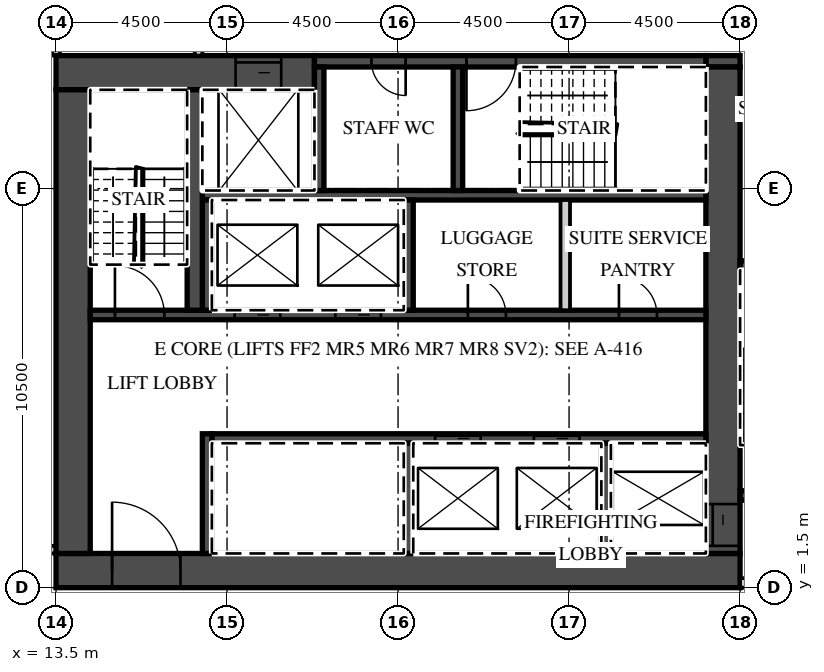
"""IFC4 building model, lengths in metres.
Left out: names, types, materials, properties, quantities, classifications, styles, units other than length and angle.
Written with IfcOpenShell. Run it as: python <this file> out.ifc"""

import sys

from ifc_helpers import new_model, si_unit, direction, frame, frame_2d, origin, place, context, subcontext, project, spatial, rectangle, extrude, element, fill, save


model = new_model("IFC4")
c1 = context("Model", 3, precision=1e-05, world=origin(), true_north=direction((0.0, 1.0)))
c2 = subcontext(c1, "Body", "Model", "MODEL_VIEW")
j1 = project(units=[si_unit("LENGTHUNIT", "METRE"), si_unit("PLANEANGLEUNIT", "RADIAN")], contexts=[c1])
p1 = place(None, origin())
s1 = spatial("IfcSite", under=j1, at=p1, CompositionType="ELEMENT")
p2 = place(p1, origin())
s2 = spatial("IfcBuilding", under=s1, at=p2, CompositionType="ELEMENT")
p3 = place(p2, frame((0.0, 0.0, 190.0)))
s3 = spatial("IfcBuildingStorey", under=s2, at=p3, CompositionType="ELEMENT", Elevation=190.0)
p4 = place(p3, frame((13.5, 15.5, 0.0), z_axis=(0.0, 0.0, 1.0), x_axis=(0.0, 1.0, 0.0)))
e1 = element("IfcWall", 1, at=p4, inside=s3, PredefinedType="PARTITIONING", context=c2, shape_type="SweptSolid", body=[
    extrude(rectangle(XDim=6.089, YDim=0.2, at=frame_2d((3.044, 0.0))), origin(), (0.0, 0.0, 1.0), 3.02),
])
p5 = place(p3, frame((-13.5, 2.5, 0.0), z_axis=(0.0, 0.0, 1.0), x_axis=(1.0, 0.0, 0.0)))
e2 = element("IfcWall", 2, at=p5, inside=s3, PredefinedType="PARTITIONING", context=c2, shape_type="SweptSolid", body=[
    extrude(rectangle(XDim=27.0, YDim=0.2, at=frame_2d((13.5, 0.0))), origin(), (0.0, 0.0, 1.0), 3.02),
])
p6 = place(p5, frame((0.575, 0.0, 0.0)))
e3 = element("IfcOpeningElement", 3, at=p6, cuts=e2, PredefinedType="OPENING", context=c2, shape_type="SweptSolid", body=[
    extrude(rectangle(XDim=1.0, YDim=2.1, at=frame_2d((0.5, 1.05))), frame((0.0, 0.11, 0.0), z_axis=(0.0, -1.0, 0.0), x_axis=(1.0, 0.0, 0.0)), (0.0, 0.0, 1.0), 0.22),
])
p7 = place(p5, frame((9.863, 0.0, 0.0)))
e4 = element("IfcOpeningElement", 4, at=p7, cuts=e2, PredefinedType="OPENING", context=c2, shape_type="SweptSolid", body=[
    extrude(rectangle(XDim=1.2, YDim=2.1, at=frame_2d((0.6, 1.05))), frame((0.0, 0.11, 0.0), z_axis=(0.0, -1.0, 0.0), x_axis=(1.0, 0.0, 0.0)), (0.0, 0.0, 1.0), 0.22),
])
p8 = place(p5, frame((18.862, 0.0, 0.0)))
e5 = element("IfcOpeningElement", 5, at=p8, cuts=e2, PredefinedType="OPENING", context=c2, shape_type="SweptSolid", body=[
    extrude(rectangle(XDim=1.2, YDim=2.1, at=frame_2d((0.6, 1.05))), frame((0.0, 0.11, 0.0), z_axis=(0.0, -1.0, 0.0), x_axis=(1.0, 0.0, 0.0)), (0.0, 0.0, 1.0), 0.22),
])
p9 = place(p5, frame((25.425, 0.0, 0.0)))
e6 = element("IfcOpeningElement", 6, at=p9, cuts=e2, PredefinedType="OPENING", context=c2, shape_type="SweptSolid", body=[
    extrude(rectangle(XDim=1.0, YDim=2.1, at=frame_2d((0.5, 1.05))), frame((0.0, 0.11, 0.0), z_axis=(0.0, -1.0, 0.0), x_axis=(1.0, 0.0, 0.0)), (0.0, 0.0, 1.0), 0.22),
])
p10 = place(p3, frame((13.5, 1.95, 0.0), z_axis=(0.0, 0.0, 1.0), x_axis=(1.0, 0.0, 0.0)))
e7 = element("IfcWall", 7, at=p10, inside=s3, PredefinedType="SHEAR", context=c2, shape_type="SweptSolid", body=[
    extrude(rectangle(XDim=18.0, YDim=0.9, at=frame_2d((9.0, 0.0))), origin(), (0.0, 0.0, 1.0), 3.02),
])
p11 = place(p10, frame((1.475, 0.0, 0.0)))
e8 = element("IfcOpeningElement", 8, at=p11, cuts=e7, PredefinedType="OPENING", context=c2, shape_type="SweptSolid", body=[
    extrude(rectangle(XDim=1.8, YDim=2.1, at=frame_2d((0.9, 1.05))), frame((0.0, 0.46, 0.0), z_axis=(0.0, -1.0, 0.0), x_axis=(1.0, 0.0, 0.0)), (0.0, 0.0, 1.0), 0.92),
])
p12 = place(p3, frame((13.5, 15.05, 0.0), z_axis=(0.0, 0.0, 1.0), x_axis=(1.0, 0.0, 0.0)))
e9 = element("IfcWall", 9, at=p12, inside=s3, PredefinedType="SHEAR", context=c2, shape_type="SweptSolid", body=[
    extrude(rectangle(XDim=6.8, YDim=0.9, at=frame_2d((3.4, 0.0))), origin(), (0.0, 0.0, 1.0), 3.02),
])
p13 = place(p12, frame((4.725, 0.0, 0.0)))
e10 = element("IfcOpeningElement", 10, at=p13, cuts=e9, PredefinedType="OPENING", context=c2, shape_type="SweptSolid", body=[
    extrude(rectangle(XDim=1.2, YDim=2.1, at=frame_2d((0.6, 1.05))), frame((0.0, 0.46, 0.0), z_axis=(0.0, -1.0, 0.0), x_axis=(1.0, 0.0, 0.0)), (0.0, 0.0, 1.0), 0.92),
])
p14 = place(p3, frame((30.6, 15.35, 0.0), z_axis=(0.0, 0.0, 1.0), x_axis=(1.0, 0.0, 0.0)))
e11 = element("IfcWall", 11, at=p14, inside=s3, PredefinedType="SHEAR", context=c2, shape_type="SweptSolid", body=[
    extrude(rectangle(XDim=0.9, YDim=0.3, at=frame_2d((0.45, 0.0))), origin(), (0.0, 0.0, 1.0), 3.02),
])
p15 = place(p3, frame((20.3, 15.35, 0.0), z_axis=(0.0, 0.0, 1.0), x_axis=(1.0, 0.0, 0.0)))
e12 = element("IfcWall", 12, at=p15, inside=s3, PredefinedType="SHEAR", context=c2, shape_type="SweptSolid", body=[
    extrude(rectangle(XDim=10.3, YDim=0.3, at=frame_2d((5.15, 0.0))), origin(), (0.0, 0.0, 1.0), 3.02),
])
p16 = place(p15, frame((4.0, 0.0, 0.0)))
e13 = element("IfcOpeningElement", 13, at=p16, cuts=e12, PredefinedType="OPENING", context=c2, shape_type="SweptSolid", body=[
    extrude(rectangle(XDim=1.3, YDim=2.1, at=frame_2d((0.65, 1.05))), frame((0.0, 0.16, 0.0), z_axis=(0.0, -1.0, 0.0), x_axis=(1.0, 0.0, 0.0)), (0.0, 0.0, 1.0), 0.32),
])
p17 = place(p15, frame((1.5, 0.0, 0.0)))
e14 = element("IfcOpeningElement", 14, at=p17, cuts=e12, PredefinedType="OPENING", context=c2, shape_type="SweptSolid", body=[
    extrude(rectangle(XDim=0.9, YDim=2.1, at=frame_2d((0.45, 1.05))), frame((0.0, 0.16, 0.0), z_axis=(0.0, -1.0, 0.0), x_axis=(1.0, 0.0, 0.0)), (0.0, 0.0, 1.0), 0.32),
])
p18 = place(p3, frame((31.05, 2.4, 0.0), z_axis=(0.0, 0.0, 1.0), x_axis=(0.0, 1.0, 0.0)))
e15 = element("IfcWall", 15, at=p18, inside=s3, PredefinedType="SHEAR", context=c2, shape_type="SweptSolid", body=[
    extrude(rectangle(XDim=12.8, YDim=0.9, at=frame_2d((6.4, 0.0))), origin(), (0.0, 0.0, 1.0), 3.02),
])
p19 = place(p18, frame((0.2, 0.0, 0.0)))
e16 = element("IfcOpeningElement", 16, at=p19, cuts=e15, PredefinedType="OPENING", context=c2, shape_type="SweptSolid", body=[
    extrude(rectangle(XDim=1.1, YDim=2.1, at=frame_2d((0.55, 1.05))), frame((0.0, 0.46, 0.0), z_axis=(0.0, -1.0, 0.0), x_axis=(1.0, 0.0, 0.0)), (0.0, 0.0, 1.0), 0.92),
])
p20 = place(p3, frame((13.95, 2.4, 0.0), z_axis=(0.0, 0.0, 1.0), x_axis=(0.0, 1.0, 0.0)))
e17 = element("IfcWall", 17, at=p20, inside=s3, PredefinedType="SHEAR", context=c2, shape_type="SweptSolid", body=[
    extrude(rectangle(XDim=12.2, YDim=0.9, at=frame_2d((6.1, 0.0))), origin(), (0.0, 0.0, 1.0), 3.02),
])
p21 = place(p3, frame((17.6, 5.425, 0.0), z_axis=(0.0, 0.0, 1.0), x_axis=(1.0, 0.0, 0.0)))
e18 = element("IfcWall", 18, at=p21, inside=s3, PredefinedType="SHEAR", context=c2, shape_type="SweptSolid", body=[
    extrude(rectangle(XDim=13.0, YDim=0.25, at=frame_2d((6.5, 0.0))), origin(), (0.0, 0.0, 1.0), 3.02),
])
p22 = place(p21, frame((8.475, 0.0, 0.0)))
e19 = element("IfcOpeningElement", 19, at=p22, cuts=e18, PredefinedType="OPENING", context=c2, shape_type="SweptSolid", body=[
    extrude(rectangle(XDim=1.2, YDim=2.1, at=frame_2d((0.6, 1.05))), frame((0.0, 0.135, 0.0), z_axis=(0.0, -1.0, 0.0), x_axis=(1.0, 0.0, 0.0)), (0.0, 0.0, 1.0), 0.27),
])
p23 = place(p21, frame((5.875, 0.0, 0.0)))
e20 = element("IfcOpeningElement", 20, at=p23, cuts=e18, PredefinedType="OPENING", context=c2, shape_type="SweptSolid", body=[
    extrude(rectangle(XDim=1.2, YDim=2.1, at=frame_2d((0.6, 1.05))), frame((0.0, 0.135, 0.0), z_axis=(0.0, -1.0, 0.0), x_axis=(1.0, 0.0, 0.0)), (0.0, 0.0, 1.0), 0.27),
])
p24 = place(p3, frame((17.475, 2.4, 0.0), z_axis=(0.0, 0.0, 1.0), x_axis=(0.0, 1.0, 0.0)))
e21 = element("IfcWall", 21, at=p24, inside=s3, PredefinedType="SHEAR", context=c2, shape_type="SweptSolid", body=[
    extrude(rectangle(XDim=3.15, YDim=0.25, at=frame_2d((1.575, 0.0))), origin(), (0.0, 0.0, 1.0), 3.02),
])
for number, where, z_axis, x_axis in (
    (22, (27.975, 2.4, 0.0), (0.0, 0.0, 1.0), (0.0, 1.0, 0.0)),
    (23, (22.775, 2.4, 0.0), (0.0, 0.0, 1.0), (0.0, 1.0, 0.0)),
):
    element("IfcWall", number, at=place(p3, frame(where, z_axis=z_axis, x_axis=x_axis)), inside=s3, PredefinedType="SHEAR", context=c2, shape_type="SweptSolid", body=[
        extrude(rectangle(XDim=2.9, YDim=0.25, at=frame_2d((1.45, 0.0))), origin(), (0.0, 0.0, 1.0), 3.02),
    ])
p25 = place(p3, frame((14.4, 8.675, 0.0), z_axis=(0.0, 0.0, 1.0), x_axis=(1.0, 0.0, 0.0)))
e24 = element("IfcWall", 24, at=p25, inside=s3, PredefinedType="SHEAR", context=c2, shape_type="SweptSolid", body=[
    extrude(rectangle(XDim=16.2, YDim=0.25, at=frame_2d((8.1, 0.0))), origin(), (0.0, 0.0, 1.0), 3.02),
])
p26 = place(p25, frame((6.45, 0.0, 0.0)))
e25 = element("IfcOpeningElement", 25, at=p26, cuts=e24, PredefinedType="OPENING", context=c2, shape_type="SweptSolid", body=[
    extrude(rectangle(XDim=1.2, YDim=2.1, at=frame_2d((0.6, 1.05))), frame((0.0, 0.135, 0.0), z_axis=(0.0, -1.0, 0.0), x_axis=(1.0, 0.0, 0.0)), (0.0, 0.0, 1.0), 0.27),
])
p27 = place(p25, frame((3.8, 0.0, 0.0)))
e26 = element("IfcOpeningElement", 26, at=p27, cuts=e24, PredefinedType="OPENING", context=c2, shape_type="SweptSolid", body=[
    extrude(rectangle(XDim=1.2, YDim=2.1, at=frame_2d((0.6, 1.05))), frame((0.0, 0.135, 0.0), z_axis=(0.0, -1.0, 0.0), x_axis=(1.0, 0.0, 0.0)), (0.0, 0.0, 1.0), 0.27),
])
p28 = place(p25, frame((0.65, 0.0, 0.0)))
e27 = element("IfcOpeningElement", 27, at=p28, cuts=e24, PredefinedType="OPENING", context=c2, shape_type="SweptSolid", body=[
    extrude(rectangle(XDim=1.3, YDim=2.1, at=frame_2d((0.65, 1.05))), frame((0.0, 0.135, 0.0), z_axis=(0.0, -1.0, 0.0), x_axis=(1.0, 0.0, 0.0)), (0.0, 0.0, 1.0), 0.27),
])
p29 = place(p25, frame((13.913, 0.0, 0.0)))
e28 = element("IfcOpeningElement", 28, at=p29, cuts=e24, PredefinedType="OPENING", context=c2, shape_type="SweptSolid", body=[
    extrude(rectangle(XDim=1.0, YDim=2.1, at=frame_2d((0.5, 1.05))), frame((0.0, 0.135, 0.0), z_axis=(0.0, -1.0, 0.0), x_axis=(1.0, 0.0, 0.0)), (0.0, 0.0, 1.0), 0.27),
])
p30 = place(p25, frame((9.938, 0.0, 0.0)))
e29 = element("IfcOpeningElement", 29, at=p30, cuts=e24, PredefinedType="OPENING", context=c2, shape_type="SweptSolid", body=[
    extrude(rectangle(XDim=1.0, YDim=2.1, at=frame_2d((0.5, 1.05))), frame((0.0, 0.135, 0.0), z_axis=(0.0, -1.0, 0.0), x_axis=(1.0, 0.0, 0.0)), (0.0, 0.0, 1.0), 0.27),
])
p31 = place(p3, frame((17.35, 11.825, 0.0), z_axis=(0.0, 0.0, 1.0), x_axis=(1.0, 0.0, 0.0)))
e30 = element("IfcWall", 30, at=p31, inside=s3, PredefinedType="SHEAR", context=c2, shape_type="SweptSolid", body=[
    extrude(rectangle(XDim=13.25, YDim=0.25, at=frame_2d((6.625, 0.0))), origin(), (0.0, 0.0, 1.0), 3.02),
])
for number, where, z_axis, x_axis in (
    (31, (17.475, 8.8, 0.0), (0.0, 0.0, 1.0), (0.0, 1.0, 0.0)),
    (32, (22.775, 8.8, 0.0), (0.0, 0.0, 1.0), (0.0, 1.0, 0.0)),
):
    element("IfcWall", number, at=place(p3, frame(where, z_axis=z_axis, x_axis=x_axis)), inside=s3, PredefinedType="SHEAR", context=c2, shape_type="SweptSolid", body=[
        extrude(rectangle(XDim=2.9, YDim=0.25, at=frame_2d((1.45, 0.0))), origin(), (0.0, 0.0, 1.0), 3.02),
    ])
p32 = place(p3, frame((26.9, 8.8, 0.0), z_axis=(0.0, 0.0, 1.0), x_axis=(0.0, 1.0, 0.0)))
e33 = element("IfcWall", 33, at=p32, inside=s3, PredefinedType="PARTITIONING", context=c2, shape_type="SweptSolid", body=[
    extrude(rectangle(XDim=2.9, YDim=0.25, at=frame_2d((1.45, 0.0))), origin(), (0.0, 0.0, 1.0), 3.02),
])
p33 = place(p3, frame((17.15, 8.8, 0.0), z_axis=(0.0, 0.0, 1.0), x_axis=(0.0, 1.0, 0.0)))
e34 = element("IfcWall", 34, at=p33, inside=s3, PredefinedType="SHEAR", context=c2, shape_type="SweptSolid", body=[
    extrude(rectangle(XDim=5.8, YDim=0.4, at=frame_2d((2.9, 0.0))), origin(), (0.0, 0.0, 1.0), 3.02),
])
for number, where, z_axis, x_axis in (
    (35, (20.425, 11.95, 0.0), (0.0, 0.0, 1.0), (0.0, 1.0, 0.0)),
    (36, (24.075, 11.95, 0.0), (0.0, 0.0, 1.0), (0.0, 1.0, 0.0)),
):
    element("IfcWall", number, at=place(p3, frame(where, z_axis=z_axis, x_axis=x_axis)), inside=s3, PredefinedType="SHEAR", context=c2, shape_type="SweptSolid", body=[
        extrude(rectangle(XDim=3.25, YDim=0.25, at=frame_2d((1.625, 0.0))), origin(), (0.0, 0.0, 1.0), 3.02),
    ])
p34 = place(p3, frame((31.5, 1.625, 0.0), z_axis=(0.0, 0.0, 1.0), x_axis=(1.0, 0.0, 0.0)))
e37 = element("IfcWall", 37, at=p34, inside=s3, PredefinedType="PARTITIONING", context=c2, shape_type="SweptSolid", body=[
    extrude(rectangle(XDim=8.035, YDim=0.25, at=frame_2d((4.018, 0.0))), origin(), (0.0, 0.0, 1.0), 3.02),
])
p35 = place(p34, frame((0.625, 0.0, 0.0)))
e38 = element("IfcOpeningElement", 38, at=p35, cuts=e37, PredefinedType="OPENING", context=c2, shape_type="SweptSolid", body=[
    extrude(rectangle(XDim=1.3, YDim=2.1, at=frame_2d((0.65, 1.05))), frame((0.0, 0.135, 0.0), z_axis=(0.0, -1.0, 0.0), x_axis=(1.0, 0.0, 0.0)), (0.0, 0.0, 1.0), 0.27),
])
p36 = place(p34, frame((3.25, 0.0, 0.0)))
e39 = element("IfcOpeningElement", 39, at=p36, cuts=e37, PredefinedType="OPENING", context=c2, shape_type="SweptSolid", body=[
    extrude(rectangle(XDim=1.1, YDim=2.1, at=frame_2d((0.55, 1.05))), frame((0.0, 0.135, 0.0), z_axis=(0.0, -1.0, 0.0), x_axis=(1.0, 0.0, 0.0)), (0.0, 0.0, 1.0), 0.27),
])
p37 = place(p3, frame((31.5, 3.925, 0.0), z_axis=(0.0, 0.0, 1.0), x_axis=(1.0, 0.0, 0.0)))
e40 = element("IfcWall", 40, at=p37, inside=s3, PredefinedType="SHEAR", context=c2, shape_type="SweptSolid", body=[
    extrude(rectangle(XDim=2.55, YDim=0.25, at=frame_2d((1.275, 0.0))), origin(), (0.0, 0.0, 1.0), 3.02),
])
p38 = place(p37, frame((0.625, 0.0, 0.0)))
e41 = element("IfcOpeningElement", 41, at=p38, cuts=e40, PredefinedType="OPENING", context=c2, shape_type="SweptSolid", body=[
    extrude(rectangle(XDim=1.3, YDim=2.1, at=frame_2d((0.65, 1.05))), frame((0.0, 0.135, 0.0), z_axis=(0.0, -1.0, 0.0), x_axis=(1.0, 0.0, 0.0)), (0.0, 0.0, 1.0), 0.27),
])
p39 = place(p3, frame((31.5, 9.975, 0.0), z_axis=(0.0, 0.0, 1.0), x_axis=(1.0, 0.0, 0.0)))
e42 = element("IfcWall", 42, at=p39, inside=s3, PredefinedType="SHEAR", context=c2, shape_type="SweptSolid", body=[
    extrude(rectangle(XDim=2.55, YDim=0.25, at=frame_2d((1.275, 0.0))), origin(), (0.0, 0.0, 1.0), 3.02),
])
p40 = place(p3, frame((17.25, 15.5, 0.0), z_axis=(0.0, 0.0, 1.0), x_axis=(0.0, 1.0, 0.0)))
e43 = element("IfcWall", 43, at=p40, inside=s3, PredefinedType="PARTITIONING", context=c2, shape_type="SweptSolid", body=[
    extrude(rectangle(XDim=2.2, YDim=0.2, at=frame_2d((1.1, 0.0))), origin(), (0.0, 0.0, 1.0), 3.02),
])
p41 = place(p26, origin())
e44 = element("IfcDoor", 44, at=p41, inside=s3, OperationType="SLIDING_TO_LEFT", PredefinedType="DOOR", context=c2, shape_type="SweptSolid", body=[
    extrude(rectangle(XDim=1.2, YDim=2.1, at=frame_2d((0.6, 1.05))), frame((0.0, 0.025, 0.0), z_axis=(0.0, -1.0, 0.0), x_axis=(1.0, 0.0, 0.0)), (0.0, 0.0, 1.0), 0.05),
])
fill(e25, e44)
p42 = place(p27, origin())
e45 = element("IfcDoor", 45, at=p42, inside=s3, OperationType="SLIDING_TO_RIGHT", PredefinedType="DOOR", context=c2, shape_type="SweptSolid", body=[
    extrude(rectangle(XDim=1.2, YDim=2.1, at=frame_2d((0.6, 1.05))), frame((0.0, 0.025, 0.0), z_axis=(0.0, -1.0, 0.0), x_axis=(1.0, 0.0, 0.0)), (0.0, 0.0, 1.0), 0.05),
])
fill(e26, e45)
p43 = place(p22, origin())
e46 = element("IfcDoor", 46, at=p43, inside=s3, OperationType="SLIDING_TO_LEFT", PredefinedType="DOOR", context=c2, shape_type="SweptSolid", body=[
    extrude(rectangle(XDim=1.2, YDim=2.1, at=frame_2d((0.6, 1.05))), frame((0.0, 0.025, 0.0), z_axis=(0.0, -1.0, 0.0), x_axis=(1.0, 0.0, 0.0)), (0.0, 0.0, 1.0), 0.05),
])
fill(e19, e46)
p44 = place(p23, origin())
e47 = element("IfcDoor", 47, at=p44, inside=s3, OperationType="SLIDING_TO_RIGHT", PredefinedType="DOOR", context=c2, shape_type="SweptSolid", body=[
    extrude(rectangle(XDim=1.2, YDim=2.1, at=frame_2d((0.6, 1.05))), frame((0.0, 0.025, 0.0), z_axis=(0.0, -1.0, 0.0), x_axis=(1.0, 0.0, 0.0)), (0.0, 0.0, 1.0), 0.05),
])
fill(e20, e47)
p45 = place(p13, origin())
e48 = element("IfcDoor", 48, at=p45, inside=s3, OperationType="SLIDING_TO_LEFT", PredefinedType="DOOR", context=c2, shape_type="SweptSolid", body=[
    extrude(rectangle(XDim=1.2, YDim=2.1, at=frame_2d((0.6, 1.05))), frame((0.0, 0.025, 0.0), z_axis=(0.0, -1.0, 0.0), x_axis=(1.0, 0.0, 0.0)), (0.0, 0.0, 1.0), 0.05),
])
fill(e10, e48)
p46 = place(p19, origin())
e49 = element("IfcDoor", 49, at=p46, inside=s3, OperationType="SLIDING_TO_LEFT", PredefinedType="DOOR", context=c2, shape_type="SweptSolid", body=[
    extrude(rectangle(XDim=1.1, YDim=2.1, at=frame_2d((0.55, 1.05))), frame((0.0, 0.025, 0.0), z_axis=(0.0, -1.0, 0.0), x_axis=(1.0, 0.0, 0.0)), (0.0, 0.0, 1.0), 0.05),
])
fill(e16, e49)
p47 = place(p11, origin())
e50 = element("IfcDoor", 50, at=p47, inside=s3, OperationType="DOUBLE_DOOR_DOUBLE_SWING", PredefinedType="DOOR", context=c2, shape_type="SweptSolid", body=[
    extrude(rectangle(XDim=1.8, YDim=2.1, at=frame_2d((0.9, 1.05))), frame((0.0, 0.025, 0.0), z_axis=(0.0, -1.0, 0.0), x_axis=(1.0, 0.0, 0.0)), (0.0, 0.0, 1.0), 0.05),
])
fill(e8, e50)
p48 = place(p28, origin())
e51 = element("IfcDoor", 51, at=p48, inside=s3, OperationType="SINGLE_SWING_LEFT", PredefinedType="DOOR", context=c2, shape_type="SweptSolid", body=[
    extrude(rectangle(XDim=1.3, YDim=2.1, at=frame_2d((0.65, 1.05))), frame((0.0, 0.025, 0.0), z_axis=(0.0, -1.0, 0.0), x_axis=(1.0, 0.0, 0.0)), (0.0, 0.0, 1.0), 0.05),
])
fill(e27, e51)
p49 = place(p16, origin())
e52 = element("IfcDoor", 52, at=p49, inside=s3, OperationType="SINGLE_SWING_LEFT", PredefinedType="DOOR", context=c2, shape_type="SweptSolid", body=[
    extrude(rectangle(XDim=1.3, YDim=2.1, at=frame_2d((0.65, 1.05))), frame((0.0, 0.025, 0.0), z_axis=(0.0, -1.0, 0.0), x_axis=(1.0, 0.0, 0.0)), (0.0, 0.0, 1.0), 0.05),
])
fill(e13, e52)
p50 = place(p17, origin())
e53 = element("IfcDoor", 53, at=p50, inside=s3, OperationType="SINGLE_SWING_RIGHT", PredefinedType="DOOR", context=c2, shape_type="SweptSolid", body=[
    extrude(rectangle(XDim=0.9, YDim=2.1, at=frame_2d((0.45, 1.05))), frame((0.0, 0.025, 0.0), z_axis=(0.0, -1.0, 0.0), x_axis=(1.0, 0.0, 0.0)), (0.0, 0.0, 1.0), 0.05),
])
fill(e14, e53)
p51 = place(p29, origin())
e54 = element("IfcDoor", 54, at=p51, inside=s3, OperationType="SINGLE_SWING_LEFT", PredefinedType="DOOR", context=c2, shape_type="SweptSolid", body=[
    extrude(rectangle(XDim=1.0, YDim=2.1, at=frame_2d((0.5, 1.05))), frame((0.0, 0.025, 0.0), z_axis=(0.0, -1.0, 0.0), x_axis=(1.0, 0.0, 0.0)), (0.0, 0.0, 1.0), 0.05),
])
fill(e28, e54)
p52 = place(p30, origin())
e55 = element("IfcDoor", 55, at=p52, inside=s3, OperationType="SINGLE_SWING_LEFT", PredefinedType="DOOR", context=c2, shape_type="SweptSolid", body=[
    extrude(rectangle(XDim=1.0, YDim=2.1, at=frame_2d((0.5, 1.05))), frame((0.0, 0.025, 0.0), z_axis=(0.0, -1.0, 0.0), x_axis=(1.0, 0.0, 0.0)), (0.0, 0.0, 1.0), 0.05),
])
fill(e29, e55)
save(model, sys.argv[1])
